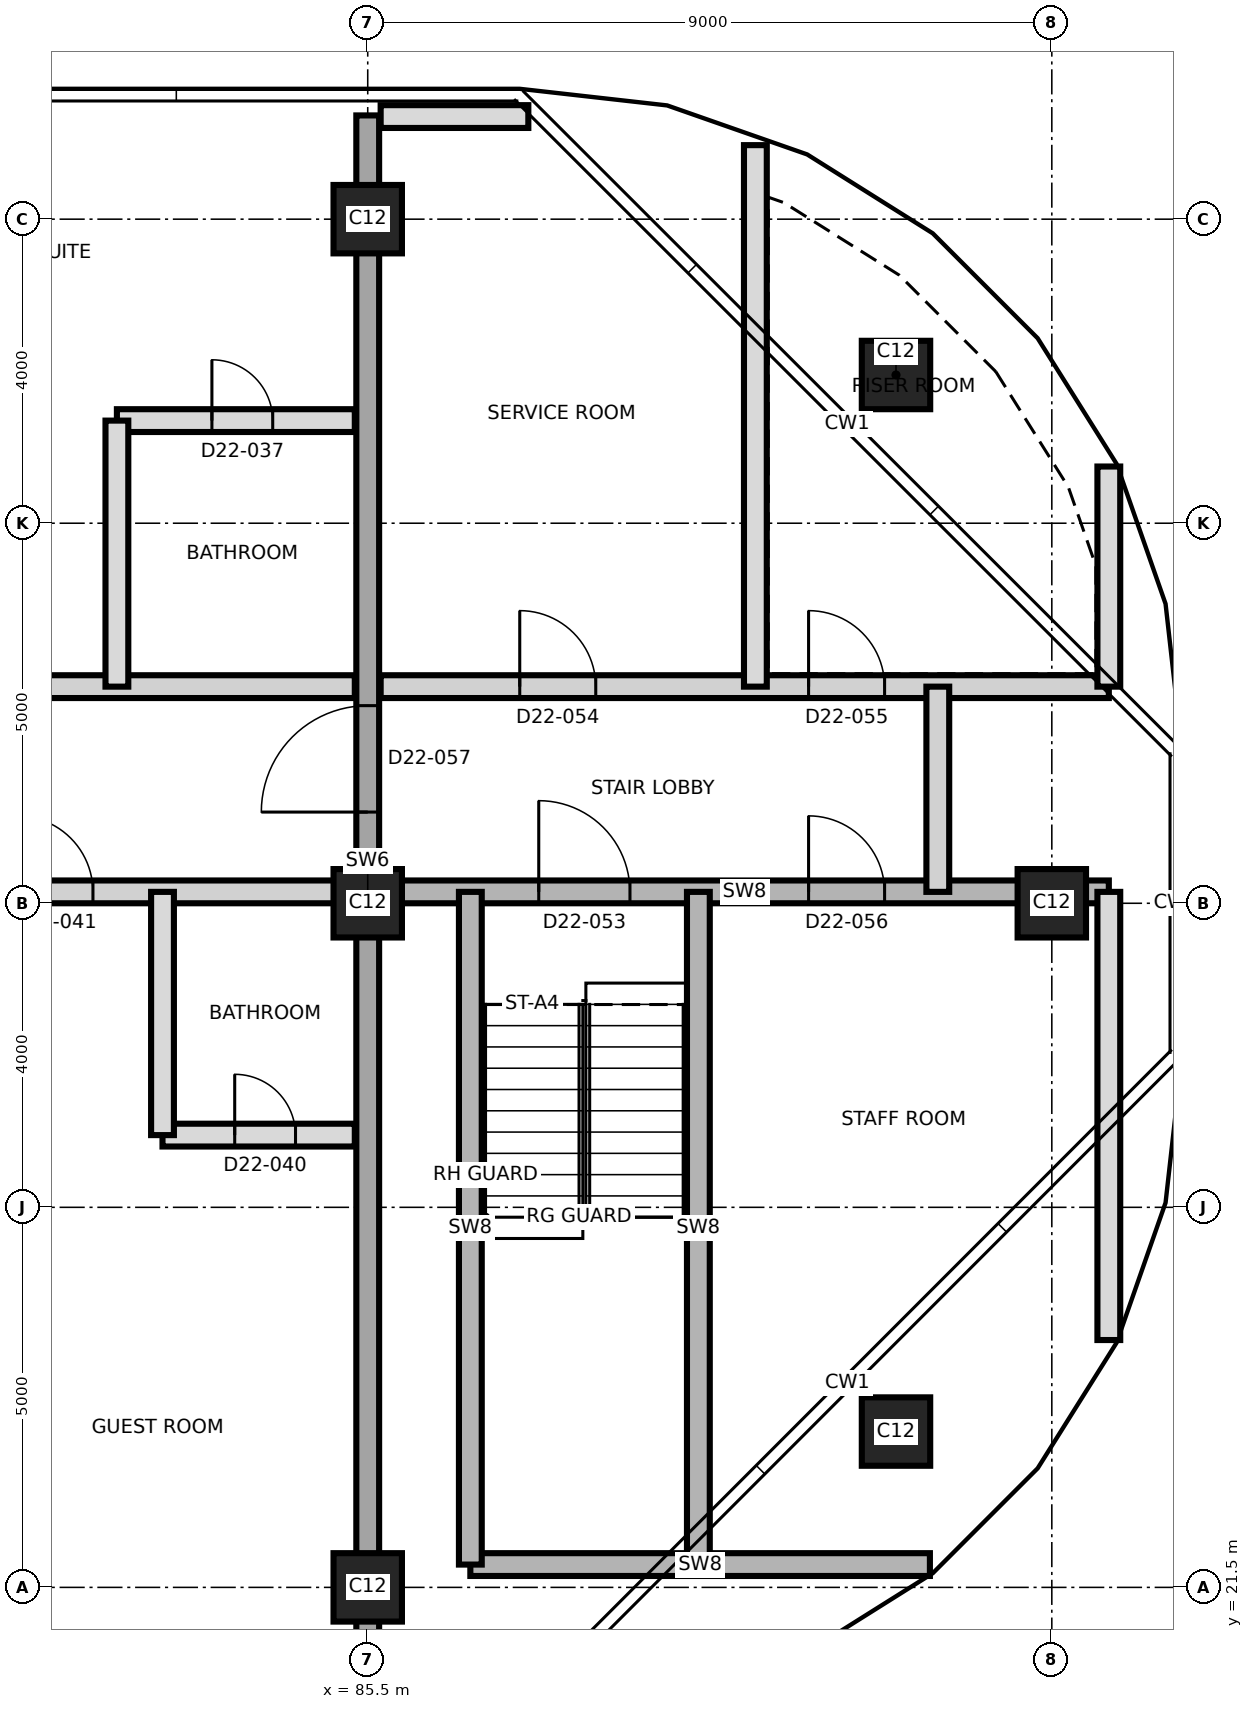
"""IFC4 building model, lengths in metres.
Left out: names, types, materials, properties, quantities, classifications, styles, units other than length and angle.
Written with IfcOpenShell. Run it as: python <this file> out.ifc"""

import sys

from ifc_helpers import new_model, si_unit, direction, frame, frame_2d, origin, origin_2d, place, context, subcontext, project, spatial, rectangle, extrude, element, fill, save


model = new_model("IFC4")
c1 = context("Model", 3, precision=1e-05, world=origin(), true_north=direction((0.0, 1.0)))
c2 = subcontext(c1, "Body", "Model", "MODEL_VIEW")
j1 = project(units=[si_unit("LENGTHUNIT", "METRE"), si_unit("PLANEANGLEUNIT", "RADIAN")], contexts=[c1])
p1 = place(None, origin())
s1 = spatial("IfcSite", under=j1, at=p1, CompositionType="ELEMENT")
p2 = place(p1, origin())
s2 = spatial("IfcBuilding", under=s1, at=p2, CompositionType="ELEMENT")
p3 = place(p2, frame((0.0, 0.0, 203.2)))
s3 = spatial("IfcBuildingStorey", under=s2, at=p3, CompositionType="ELEMENT", Elevation=203.2)
for number, where, z_axis, x_axis in (
    (1, (85.5, 21.5, 0.0), (0.0, 0.0, 1.0), (1.0, 0.0, 0.0)),
    (2, (92.45, 23.55, 0.0), (0.0, 0.0, 1.0), (1.0, 0.0, 0.0)),
    (3, (85.5, 30.5, 0.0), (0.0, 0.0, 1.0), (1.0, 0.0, 0.0)),
    (4, (94.5, 30.5, 0.0), (0.0, 0.0, 1.0), (1.0, 0.0, 0.0)),
    (5, (92.45, 37.45, 0.0), (0.0, 0.0, 1.0), (1.0, 0.0, 0.0)),
    (6, (85.5, 39.5, 0.0), (0.0, 0.0, 1.0), (1.0, 0.0, 0.0)),
):
    element("IfcColumn", number, at=place(p3, frame(where, z_axis=z_axis, x_axis=x_axis)), inside=s3, PredefinedType="COLUMN", context=c2, shape_type="SweptSolid", body=[
        extrude(rectangle(XDim=0.9, YDim=0.9, at=origin_2d()), origin(), (0.0, 0.0, 1.0), 3.7),
    ])
p4 = place(p3, frame((85.5, 20.135, 0.0), z_axis=(0.0, 0.0, 1.0), x_axis=(0.0, 1.0, 0.0)))
e7 = element("IfcWall", 7, at=p4, inside=s3, PredefinedType="SHEAR", context=c2, shape_type="SweptSolid", body=[
    extrude(rectangle(XDim=20.73, YDim=0.3, at=frame_2d((10.365, 0.0))), origin(), (0.0, 0.0, 1.0), 3.7),
])
p5 = place(p4, frame((11.565, 0.0, 0.0)))
e8 = element("IfcOpeningElement", 8, at=p5, cuts=e7, PredefinedType="OPENING", context=c2, shape_type="SweptSolid", body=[
    extrude(rectangle(XDim=1.4, YDim=2.1, at=frame_2d((0.7, 1.05))), frame((0.0, 0.16, 0.0), z_axis=(0.0, -1.0, 0.0), x_axis=(1.0, 0.0, 0.0)), (0.0, 0.0, 1.0), 0.32),
])
p6 = place(p3, frame((86.85, 21.8, 0.0), z_axis=(0.0, 0.0, 1.0), x_axis=(1.0, 0.0, 0.0)))
e9 = element("IfcWall", 9, at=p6, inside=s3, PredefinedType="SHEAR", context=c2, shape_type="SweptSolid", body=[
    extrude(rectangle(XDim=6.046, YDim=0.3, at=frame_2d((3.023, 0.0))), origin(), (0.0, 0.0, 1.0), 3.4),
])
p7 = place(p3, frame((82.8, 27.45, 0.0), z_axis=(0.0, 0.0, 1.0), x_axis=(1.0, 0.0, 0.0)))
e10 = element("IfcWall", 10, at=p7, inside=s3, PredefinedType="PARTITIONING", context=c2, shape_type="SweptSolid", body=[
    extrude(rectangle(XDim=2.53, YDim=0.3, at=frame_2d((1.265, 0.0))), origin(), (0.0, 0.0, 1.0), 3.4),
])
p8 = place(p7, frame((0.95, 0.0, 0.0)))
e11 = element("IfcOpeningElement", 11, at=p8, cuts=e10, PredefinedType="OPENING", context=c2, shape_type="SweptSolid", body=[
    extrude(rectangle(XDim=0.8, YDim=2.1, at=frame_2d((0.4, 1.05))), frame((0.0, 0.16, 0.0), z_axis=(0.0, -1.0, 0.0), x_axis=(1.0, 0.0, 0.0)), (0.0, 0.0, 1.0), 0.32),
])
p9 = place(p3, frame((58.55, 30.65, 0.0), z_axis=(0.0, 0.0, 1.0), x_axis=(1.0, 0.0, 0.0)))
e12 = element("IfcWall", 12, at=p9, inside=s3, PredefinedType="PARTITIONING", context=c2, shape_type="SweptSolid", body=[
    extrude(rectangle(XDim=26.78, YDim=0.3, at=frame_2d((13.39, 0.0))), origin(), (0.0, 0.0, 1.0), 3.4),
])
p10 = place(p9, frame((1.65, 0.0, 0.0)))
e13 = element("IfcOpeningElement", 13, at=p10, cuts=e12, PredefinedType="OPENING", context=c2, shape_type="SweptSolid", body=[
    extrude(rectangle(XDim=1.2, YDim=2.1, at=frame_2d((0.6, 1.05))), frame((0.0, 0.16, 0.0), z_axis=(0.0, -1.0, 0.0), x_axis=(1.0, 0.0, 0.0)), (0.0, 0.0, 1.0), 0.32),
])
p11 = place(p9, frame((4.9, 0.0, 0.0)))
e14 = element("IfcOpeningElement", 14, at=p11, cuts=e12, PredefinedType="OPENING", context=c2, shape_type="SweptSolid", body=[
    extrude(rectangle(XDim=1.0, YDim=2.1, at=frame_2d((0.5, 1.05))), frame((0.0, 0.16, 0.0), z_axis=(0.0, -1.0, 0.0), x_axis=(1.0, 0.0, 0.0)), (0.0, 0.0, 1.0), 0.32),
])
p12 = place(p9, frame((10.085, 0.0, 0.0)))
e15 = element("IfcOpeningElement", 15, at=p12, cuts=e12, PredefinedType="OPENING", context=c2, shape_type="SweptSolid", body=[
    extrude(rectangle(XDim=1.2, YDim=2.1, at=frame_2d((0.6, 1.05))), frame((0.0, 0.16, 0.0), z_axis=(0.0, -1.0, 0.0), x_axis=(1.0, 0.0, 0.0)), (0.0, 0.0, 1.0), 0.32),
])
p13 = place(p9, frame((13.335, 0.0, 0.0)))
e16 = element("IfcOpeningElement", 16, at=p13, cuts=e12, PredefinedType="OPENING", context=c2, shape_type="SweptSolid", body=[
    extrude(rectangle(XDim=1.0, YDim=2.1, at=frame_2d((0.5, 1.05))), frame((0.0, 0.16, 0.0), z_axis=(0.0, -1.0, 0.0), x_axis=(1.0, 0.0, 0.0)), (0.0, 0.0, 1.0), 0.32),
])
p14 = place(p9, frame((19.085, 0.0, 0.0)))
e17 = element("IfcOpeningElement", 17, at=p14, cuts=e12, PredefinedType="OPENING", context=c2, shape_type="SweptSolid", body=[
    extrude(rectangle(XDim=1.2, YDim=2.1, at=frame_2d((0.6, 1.05))), frame((0.0, 0.16, 0.0), z_axis=(0.0, -1.0, 0.0), x_axis=(1.0, 0.0, 0.0)), (0.0, 0.0, 1.0), 0.32),
])
p15 = place(p9, frame((22.335, 0.0, 0.0)))
e18 = element("IfcOpeningElement", 18, at=p15, cuts=e12, PredefinedType="OPENING", context=c2, shape_type="SweptSolid", body=[
    extrude(rectangle(XDim=1.0, YDim=2.1, at=frame_2d((0.5, 1.05))), frame((0.0, 0.16, 0.0), z_axis=(0.0, -1.0, 0.0), x_axis=(1.0, 0.0, 0.0)), (0.0, 0.0, 1.0), 0.32),
])
p16 = place(p3, frame((85.67, 30.65, 0.0), z_axis=(0.0, 0.0, 1.0), x_axis=(1.0, 0.0, 0.0)))
e19 = element("IfcWall", 19, at=p16, inside=s3, PredefinedType="SHEAR", context=c2, shape_type="SweptSolid", body=[
    extrude(rectangle(XDim=9.58, YDim=0.3, at=frame_2d((4.79, 0.0))), origin(), (0.0, 0.0, 1.0), 3.4),
])
p17 = place(p16, frame((2.08, 0.0, 0.0)))
e20 = element("IfcOpeningElement", 20, at=p17, cuts=e19, PredefinedType="OPENING", context=c2, shape_type="SweptSolid", body=[
    extrude(rectangle(XDim=1.2, YDim=2.1, at=frame_2d((0.6, 1.05))), frame((0.0, 0.16, 0.0), z_axis=(0.0, -1.0, 0.0), x_axis=(1.0, 0.0, 0.0)), (0.0, 0.0, 1.0), 0.32),
])
p18 = place(p16, frame((5.63, 0.0, 0.0)))
e21 = element("IfcOpeningElement", 21, at=p18, cuts=e19, PredefinedType="OPENING", context=c2, shape_type="SweptSolid", body=[
    extrude(rectangle(XDim=1.0, YDim=2.1, at=frame_2d((0.5, 1.05))), frame((0.0, 0.16, 0.0), z_axis=(0.0, -1.0, 0.0), x_axis=(1.0, 0.0, 0.0)), (0.0, 0.0, 1.0), 0.32),
])
p19 = place(p3, frame((58.55, 33.35, 0.0), z_axis=(0.0, 0.0, 1.0), x_axis=(1.0, 0.0, 0.0)))
e22 = element("IfcWall", 22, at=p19, inside=s3, PredefinedType="PARTITIONING", context=c2, shape_type="SweptSolid", body=[
    extrude(rectangle(XDim=26.78, YDim=0.3, at=frame_2d((13.39, 0.0))), origin(), (0.0, 0.0, 1.0), 3.4),
])
p20 = place(p19, frame((1.1, 0.0, 0.0)))
e23 = element("IfcOpeningElement", 23, at=p20, cuts=e22, PredefinedType="OPENING", context=c2, shape_type="SweptSolid", body=[
    extrude(rectangle(XDim=1.0, YDim=2.1, at=frame_2d((0.5, 1.05))), frame((0.0, 0.16, 0.0), z_axis=(0.0, -1.0, 0.0), x_axis=(1.0, 0.0, 0.0)), (0.0, 0.0, 1.0), 0.32),
])
p21 = place(p19, frame((6.95, 0.0, 0.0)))
e24 = element("IfcOpeningElement", 24, at=p21, cuts=e22, PredefinedType="OPENING", context=c2, shape_type="SweptSolid", body=[
    extrude(rectangle(XDim=1.0, YDim=2.1, at=frame_2d((0.5, 1.05))), frame((0.0, 0.16, 0.0), z_axis=(0.0, -1.0, 0.0), x_axis=(1.0, 0.0, 0.0)), (0.0, 0.0, 1.0), 0.32),
])
p22 = place(p19, frame((14.6, 0.0, 0.0)))
e25 = element("IfcOpeningElement", 25, at=p22, cuts=e22, PredefinedType="OPENING", context=c2, shape_type="SweptSolid", body=[
    extrude(rectangle(XDim=1.0, YDim=2.4, at=frame_2d((0.5, 1.2))), frame((0.0, 0.16, 0.0), z_axis=(0.0, -1.0, 0.0), x_axis=(1.0, 0.0, 0.0)), (0.0, 0.0, 1.0), 0.32),
])
p23 = place(p19, frame((20.3, 0.0, 0.0)))
e26 = element("IfcOpeningElement", 26, at=p23, cuts=e22, PredefinedType="OPENING", context=c2, shape_type="SweptSolid", body=[
    extrude(rectangle(XDim=1.0, YDim=2.4, at=frame_2d((0.5, 1.2))), frame((0.0, 0.16, 0.0), z_axis=(0.0, -1.0, 0.0), x_axis=(1.0, 0.0, 0.0)), (0.0, 0.0, 1.0), 0.32),
])
p24 = place(p3, frame((85.67, 33.35, 0.0), z_axis=(0.0, 0.0, 1.0), x_axis=(1.0, 0.0, 0.0)))
e27 = element("IfcWall", 27, at=p24, inside=s3, PredefinedType="PARTITIONING", context=c2, shape_type="SweptSolid", body=[
    extrude(rectangle(XDim=9.58, YDim=0.3, at=frame_2d((4.79, 0.0))), origin(), (0.0, 0.0, 1.0), 3.35),
])
p25 = place(p24, frame((1.83, 0.0, 0.0)))
e28 = element("IfcOpeningElement", 28, at=p25, cuts=e27, PredefinedType="OPENING", context=c2, shape_type="SweptSolid", body=[
    extrude(rectangle(XDim=1.0, YDim=2.1, at=frame_2d((0.5, 1.05))), frame((0.0, 0.16, 0.0), z_axis=(0.0, -1.0, 0.0), x_axis=(1.0, 0.0, 0.0)), (0.0, 0.0, 1.0), 0.32),
])
p26 = place(p24, frame((5.63, 0.0, 0.0)))
e29 = element("IfcOpeningElement", 29, at=p26, cuts=e27, PredefinedType="OPENING", context=c2, shape_type="SweptSolid", body=[
    extrude(rectangle(XDim=1.0, YDim=2.1, at=frame_2d((0.5, 1.05))), frame((0.0, 0.16, 0.0), z_axis=(0.0, -1.0, 0.0), x_axis=(1.0, 0.0, 0.0)), (0.0, 0.0, 1.0), 0.32),
])
p27 = place(p3, frame((82.2, 36.85, 0.0), z_axis=(0.0, 0.0, 1.0), x_axis=(1.0, 0.0, 0.0)))
e30 = element("IfcWall", 30, at=p27, inside=s3, PredefinedType="PARTITIONING", context=c2, shape_type="SweptSolid", body=[
    extrude(rectangle(XDim=3.13, YDim=0.3, at=frame_2d((1.565, 0.0))), origin(), (0.0, 0.0, 1.0), 3.4),
])
p28 = place(p27, frame((1.25, 0.0, 0.0)))
e31 = element("IfcOpeningElement", 31, at=p28, cuts=e30, PredefinedType="OPENING", context=c2, shape_type="SweptSolid", body=[
    extrude(rectangle(XDim=0.8, YDim=2.1, at=frame_2d((0.4, 1.05))), frame((0.0, 0.16, 0.0), z_axis=(0.0, -1.0, 0.0), x_axis=(1.0, 0.0, 0.0)), (0.0, 0.0, 1.0), 0.32),
])
p29 = place(p3, frame((85.67, 40.85, 0.0), z_axis=(0.0, 0.0, 1.0), x_axis=(1.0, 0.0, 0.0)))
e32 = element("IfcWall", 32, at=p29, inside=s3, PredefinedType="PARTITIONING", context=c2, shape_type="SweptSolid", body=[
    extrude(rectangle(XDim=1.943, YDim=0.3, at=frame_2d((0.972, 0.0))), origin(), (0.0, 0.0, 1.0), 3.35),
])
p30 = place(p3, frame((82.2, 33.35, 0.0), z_axis=(0.0, 0.0, 1.0), x_axis=(0.0, 1.0, 0.0)))
e33 = element("IfcWall", 33, at=p30, inside=s3, PredefinedType="PARTITIONING", context=c2, shape_type="SweptSolid", body=[
    extrude(rectangle(XDim=3.5, YDim=0.3, at=frame_2d((1.75, 0.0))), origin(), (0.0, 0.0, 1.0), 3.4),
])
p31 = place(p3, frame((82.8, 27.45, 0.0), z_axis=(0.0, 0.0, 1.0), x_axis=(0.0, 1.0, 0.0)))
e34 = element("IfcWall", 34, at=p31, inside=s3, PredefinedType="PARTITIONING", context=c2, shape_type="SweptSolid", body=[
    extrude(rectangle(XDim=3.2, YDim=0.3, at=frame_2d((1.6, 0.0))), origin(), (0.0, 0.0, 1.0), 3.4),
])
for number, where, z_axis, x_axis in (
    (35, (86.85, 21.8, 0.0), (0.0, 0.0, 1.0), (0.0, 1.0, 0.0)),
    (36, (89.85, 21.8, 0.0), (0.0, 0.0, 1.0), (0.0, 1.0, 0.0)),
):
    element("IfcWall", number, at=place(p3, frame(where, z_axis=z_axis, x_axis=x_axis)), inside=s3, PredefinedType="SHEAR", context=c2, shape_type="SweptSolid", body=[
        extrude(rectangle(XDim=8.85, YDim=0.3, at=frame_2d((4.425, 0.0))), origin(), (0.0, 0.0, 1.0), 3.4),
    ])
p32 = place(p3, frame((90.6, 33.35, 0.0), z_axis=(0.0, 0.0, 1.0), x_axis=(0.0, 1.0, 0.0)))
e37 = element("IfcWall", 37, at=p32, inside=s3, PredefinedType="PARTITIONING", context=c2, shape_type="SweptSolid", body=[
    extrude(rectangle(XDim=7.124, YDim=0.3, at=frame_2d((3.562, 0.0))), origin(), (0.0, 0.0, 1.0), 3.35),
])
p33 = place(p3, frame((93.0, 30.65, 0.0), z_axis=(0.0, 0.0, 1.0), x_axis=(0.0, 1.0, 0.0)))
e38 = element("IfcWall", 38, at=p33, inside=s3, PredefinedType="PARTITIONING", context=c2, shape_type="SweptSolid", body=[
    extrude(rectangle(XDim=2.7, YDim=0.3, at=frame_2d((1.35, 0.0))), origin(), (0.0, 0.0, 1.0), 3.4),
])
p34 = place(p3, frame((95.25, 24.754, 0.0), z_axis=(0.0, 0.0, 1.0), x_axis=(0.0, 1.0, 0.0)))
e39 = element("IfcWall", 39, at=p34, inside=s3, PredefinedType="PARTITIONING", context=c2, shape_type="SweptSolid", body=[
    extrude(rectangle(XDim=5.896, YDim=0.3, at=frame_2d((2.948, 0.0))), origin(), (0.0, 0.0, 1.0), 3.35),
])
p35 = place(p3, frame((95.25, 33.35, 0.0), z_axis=(0.0, 0.0, 1.0), x_axis=(0.0, 1.0, 0.0)))
e40 = element("IfcWall", 40, at=p35, inside=s3, PredefinedType="PARTITIONING", context=c2, shape_type="SweptSolid", body=[
    extrude(rectangle(XDim=2.896, YDim=0.3, at=frame_2d((1.448, 0.0))), origin(), (0.0, 0.0, 1.0), 3.35),
])
p36 = place(p28, origin())
e41 = element("IfcDoor", 41, at=p36, inside=s3, OperationType="SINGLE_SWING_LEFT", PredefinedType="DOOR", context=c2, shape_type="SweptSolid", body=[
    extrude(rectangle(XDim=0.8, YDim=2.1, at=frame_2d((0.4, 1.05))), frame((0.0, 0.025, 0.0), z_axis=(0.0, -1.0, 0.0), x_axis=(1.0, 0.0, 0.0)), (0.0, 0.0, 1.0), 0.05),
])
fill(e31, e41)
p37 = place(p8, origin())
e42 = element("IfcDoor", 42, at=p37, inside=s3, OperationType="SINGLE_SWING_LEFT", PredefinedType="DOOR", context=c2, shape_type="SweptSolid", body=[
    extrude(rectangle(XDim=0.8, YDim=2.1, at=frame_2d((0.4, 1.05))), frame((0.0, 0.025, 0.0), z_axis=(0.0, -1.0, 0.0), x_axis=(1.0, 0.0, 0.0)), (0.0, 0.0, 1.0), 0.05),
])
fill(e11, e42)
p38 = place(p15, origin())
e43 = element("IfcDoor", 43, at=p38, inside=s3, OperationType="SINGLE_SWING_RIGHT", PredefinedType="DOOR", context=c2, shape_type="SweptSolid", body=[
    extrude(rectangle(XDim=1.0, YDim=2.1, at=frame_2d((0.5, 1.05))), frame((0.0, 0.025, 0.0), z_axis=(0.0, -1.0, 0.0), x_axis=(1.0, 0.0, 0.0)), (0.0, 0.0, 1.0), 0.05),
])
fill(e18, e43)
p39 = place(p17, origin())
e44 = element("IfcDoor", 44, at=p39, inside=s3, OperationType="SINGLE_SWING_LEFT", PredefinedType="DOOR", context=c2, shape_type="SweptSolid", body=[
    extrude(rectangle(XDim=1.2, YDim=2.1, at=frame_2d((0.6, 1.05))), frame((0.0, 0.025, 0.0), z_axis=(0.0, -1.0, 0.0), x_axis=(1.0, 0.0, 0.0)), (0.0, 0.0, 1.0), 0.05),
])
fill(e20, e44)
p40 = place(p25, origin())
e45 = element("IfcDoor", 45, at=p40, inside=s3, OperationType="SINGLE_SWING_LEFT", PredefinedType="DOOR", context=c2, shape_type="SweptSolid", body=[
    extrude(rectangle(XDim=1.0, YDim=2.1, at=frame_2d((0.5, 1.05))), frame((0.0, 0.025, 0.0), z_axis=(0.0, -1.0, 0.0), x_axis=(1.0, 0.0, 0.0)), (0.0, 0.0, 1.0), 0.05),
])
fill(e28, e45)
p41 = place(p26, origin())
e46 = element("IfcDoor", 46, at=p41, inside=s3, OperationType="SINGLE_SWING_RIGHT", PredefinedType="DOOR", context=c2, shape_type="SweptSolid", body=[
    extrude(rectangle(XDim=1.0, YDim=2.1, at=frame_2d((0.5, 1.05))), frame((0.0, 0.025, 0.0), z_axis=(0.0, -1.0, 0.0), x_axis=(1.0, 0.0, 0.0)), (0.0, 0.0, 1.0), 0.05),
])
fill(e29, e46)
p42 = place(p18, origin())
e47 = element("IfcDoor", 47, at=p42, inside=s3, OperationType="SINGLE_SWING_LEFT", PredefinedType="DOOR", context=c2, shape_type="SweptSolid", body=[
    extrude(rectangle(XDim=1.0, YDim=2.1, at=frame_2d((0.5, 1.05))), frame((0.0, 0.025, 0.0), z_axis=(0.0, -1.0, 0.0), x_axis=(1.0, 0.0, 0.0)), (0.0, 0.0, 1.0), 0.05),
])
fill(e21, e47)
p43 = place(p5, origin())
e48 = element("IfcDoor", 48, at=p43, inside=s3, OperationType="SINGLE_SWING_RIGHT", PredefinedType="DOOR", context=c2, shape_type="SweptSolid", body=[
    extrude(rectangle(XDim=1.4, YDim=2.1, at=frame_2d((0.7, 1.05))), frame((0.0, 0.025, 0.0), z_axis=(0.0, -1.0, 0.0), x_axis=(1.0, 0.0, 0.0)), (0.0, 0.0, 1.0), 0.05),
])
fill(e8, e48)
save(model, sys.argv[1])
